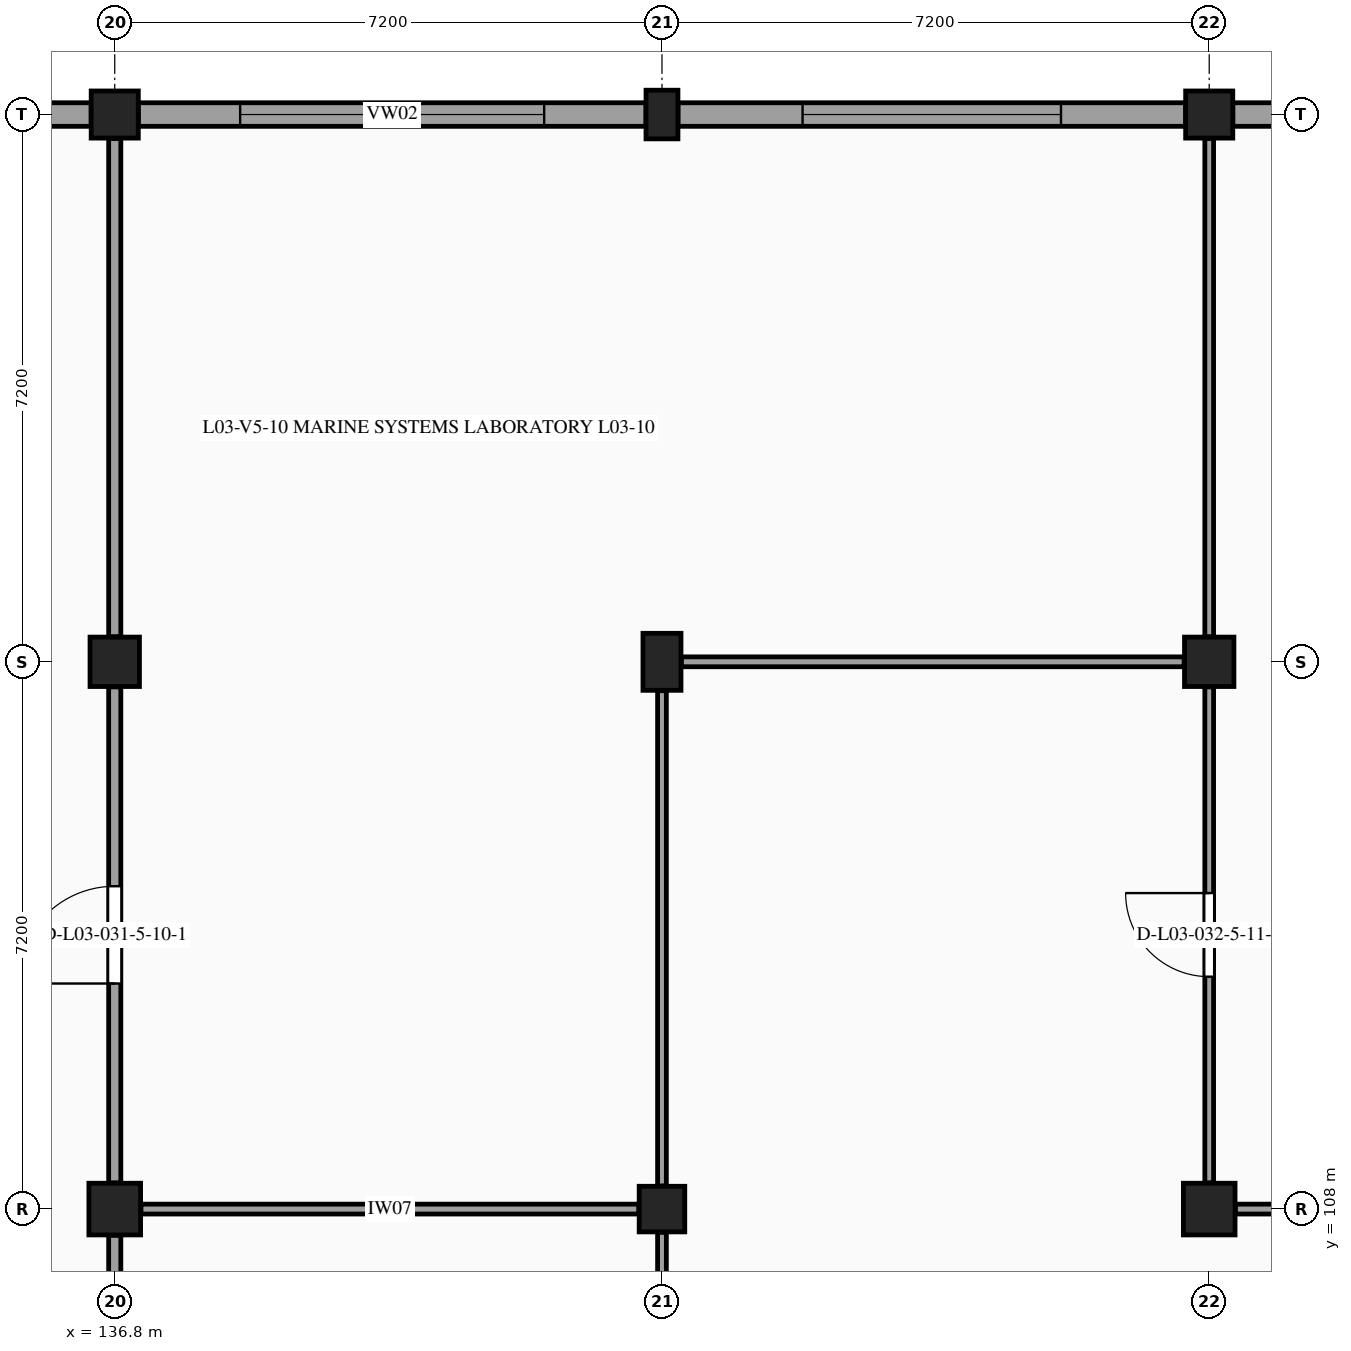
"""IFC4 building model, lengths in metres.
Left out: names, types, materials, properties, quantities, classifications, styles, units other than length and angle.
Written with IfcOpenShell. Run it as: python <this file> out.ifc"""

import sys

from ifc_helpers import new_model, si_unit, direction, frame, frame_2d, origin, origin_2d, place, context, subcontext, project, spatial, rectangle, extrude, element, fill, save


model = new_model("IFC4")
c1 = context("Model", 3, precision=1e-05, world=origin(), true_north=direction((0.0, 1.0)))
c2 = subcontext(c1, "Body", "Model", "MODEL_VIEW")
j1 = project(units=[si_unit("LENGTHUNIT", "METRE"), si_unit("PLANEANGLEUNIT", "RADIAN")], contexts=[c1])
p1 = place(None, origin())
s1 = spatial("IfcSite", under=j1, at=p1, CompositionType="ELEMENT")
p2 = place(p1, origin())
s2 = spatial("IfcBuilding", under=s1, at=p2, CompositionType="ELEMENT")
p3 = place(p2, frame((0.0, 0.0, 14.4)))
s3 = spatial("IfcBuildingStorey", under=s2, at=p3, CompositionType="ELEMENT", Elevation=14.4)
p4 = place(p3, frame((136.8, 108.0, 0.0), z_axis=(0.0, 0.0, 1.0), x_axis=(1.0, 0.0, 0.0)))
e1 = element("IfcColumn", 1, at=p4, inside=s3, PredefinedType="COLUMN", context=c2, shape_type="SweptSolid", body=[
    extrude(rectangle(XDim=0.68, YDim=0.68, at=origin_2d()), origin(), (0.0, 0.0, 1.0), 4.2),
])
p5 = place(p3, frame((136.8, 115.2, 0.0), z_axis=(0.0, 0.0, 1.0), x_axis=(1.0, 0.0, 0.0)))
e2 = element("IfcColumn", 2, at=p5, inside=s3, PredefinedType="COLUMN", context=c2, shape_type="SweptSolid", body=[
    extrude(rectangle(XDim=0.65, YDim=0.65, at=origin_2d()), origin(), (0.0, 0.0, 1.0), 4.2),
])
p6 = place(p3, frame((136.8, 122.4, 0.0), z_axis=(0.0, 0.0, 1.0), x_axis=(1.0, 0.0, 0.0)))
e3 = element("IfcColumn", 3, at=p6, inside=s3, PredefinedType="COLUMN", context=c2, shape_type="SweptSolid", body=[
    extrude(rectangle(XDim=0.62, YDim=0.62, at=origin_2d()), origin(), (0.0, 0.0, 1.0), 4.2),
])
p7 = place(p3, frame((144.0, 108.0, 0.0), z_axis=(0.0, 0.0, 1.0), x_axis=(1.0, 0.0, 0.0)))
e4 = element("IfcColumn", 4, at=p7, inside=s3, PredefinedType="COLUMN", context=c2, shape_type="SweptSolid", body=[
    extrude(rectangle(XDim=0.6, YDim=0.6, at=origin_2d()), origin(), (0.0, 0.0, 1.0), 4.2),
])
p8 = place(p3, frame((144.0, 115.2, 0.0), z_axis=(0.0, 0.0, 1.0), x_axis=(1.0, 0.0, 0.0)))
e5 = element("IfcColumn", 5, at=p8, inside=s3, PredefinedType="COLUMN", context=c2, shape_type="SweptSolid", body=[
    extrude(rectangle(XDim=0.5, YDim=0.75, at=origin_2d()), origin(), (0.0, 0.0, 1.0), 4.2),
])
p9 = place(p3, frame((144.0, 122.4, 0.0), z_axis=(0.0, 0.0, 1.0), x_axis=(1.0, 0.0, 0.0)))
e6 = element("IfcColumn", 6, at=p9, inside=s3, PredefinedType="PILASTER", context=c2, shape_type="SweptSolid", body=[
    extrude(rectangle(XDim=0.42, YDim=0.64, at=origin_2d()), origin(), (0.0, 0.0, 1.0), 4.2),
])
p10 = place(p3, frame((151.2, 108.0, 0.0), z_axis=(0.0, 0.0, 1.0), x_axis=(1.0, 0.0, 0.0)))
e7 = element("IfcColumn", 7, at=p10, inside=s3, PredefinedType="COLUMN", context=c2, shape_type="SweptSolid", body=[
    extrude(rectangle(XDim=0.68, YDim=0.68, at=origin_2d()), origin(), (0.0, 0.0, 1.0), 4.2),
])
p11 = place(p3, frame((151.2, 115.2, 0.0), z_axis=(0.0, 0.0, 1.0), x_axis=(1.0, 0.0, 0.0)))
e8 = element("IfcColumn", 8, at=p11, inside=s3, PredefinedType="COLUMN", context=c2, shape_type="SweptSolid", body=[
    extrude(rectangle(XDim=0.65, YDim=0.65, at=origin_2d()), origin(), (0.0, 0.0, 1.0), 4.2),
])
p12 = place(p3, frame((151.2, 122.4, 0.0), z_axis=(0.0, 0.0, 1.0), x_axis=(1.0, 0.0, 0.0)))
e9 = element("IfcColumn", 9, at=p12, inside=s3, PredefinedType="COLUMN", context=c2, shape_type="SweptSolid", body=[
    extrude(rectangle(XDim=0.62, YDim=0.62, at=origin_2d()), origin(), (0.0, 0.0, 1.0), 4.2),
])
p13 = place(p3, frame((129.81, 122.4, 0.0), z_axis=(0.0, 0.0, 1.0), x_axis=(1.0, 0.0, 0.0)))
e10 = element("IfcWall", 10, at=p13, inside=s3, PredefinedType="STANDARD", context=c2, shape_type="SweptSolid", body=[
    extrude(rectangle(XDim=6.68, YDim=0.31, at=frame_2d((3.34, 0.0))), origin(), (0.0, 0.0, 1.0), 3.16),
])
p14 = place(p13, frame((1.09, 0.0, 0.98)))
e11 = element("IfcOpeningElement", 11, at=p14, cuts=e10, PredefinedType="OPENING", context=c2, shape_type="SweptSolid", body=[
    extrude(rectangle(XDim=4.5, YDim=1.55, at=frame_2d((2.25, 0.775))), frame((0.0, 0.165, 0.0), z_axis=(0.0, -1.0, 0.0), x_axis=(1.0, 0.0, 0.0)), (0.0, 0.0, 1.0), 0.33),
])
p15 = place(p3, frame((137.11, 122.4, 0.0), z_axis=(0.0, 0.0, 1.0), x_axis=(1.0, 0.0, 0.0)))
e12 = element("IfcWall", 12, at=p15, inside=s3, PredefinedType="STANDARD", context=c2, shape_type="SweptSolid", body=[
    extrude(rectangle(XDim=6.68, YDim=0.31, at=frame_2d((3.34, 0.0))), origin(), (0.0, 0.0, 1.0), 3.185),
])
p16 = place(p15, frame((1.34, 0.0, 0.98)))
e13 = element("IfcOpeningElement", 13, at=p16, cuts=e12, PredefinedType="OPENING", context=c2, shape_type="SweptSolid", body=[
    extrude(rectangle(XDim=4.0, YDim=1.55, at=frame_2d((2.0, 0.775))), frame((0.0, 0.165, 0.0), z_axis=(0.0, -1.0, 0.0), x_axis=(1.0, 0.0, 0.0)), (0.0, 0.0, 1.0), 0.33),
])
p17 = place(p3, frame((144.21, 122.4, 0.0), z_axis=(0.0, 0.0, 1.0), x_axis=(1.0, 0.0, 0.0)))
e14 = element("IfcWall", 14, at=p17, inside=s3, PredefinedType="STANDARD", context=c2, shape_type="SweptSolid", body=[
    extrude(rectangle(XDim=6.68, YDim=0.31, at=frame_2d((3.34, 0.0))), origin(), (0.0, 0.0, 1.0), 3.185),
])
p18 = place(p17, frame((1.64, 0.0, 0.98)))
e15 = element("IfcOpeningElement", 15, at=p18, cuts=e14, PredefinedType="OPENING", context=c2, shape_type="SweptSolid", body=[
    extrude(rectangle(XDim=3.4, YDim=1.55, at=frame_2d((1.7, 0.775))), frame((0.0, 0.165, 0.0), z_axis=(0.0, -1.0, 0.0), x_axis=(1.0, 0.0, 0.0)), (0.0, 0.0, 1.0), 0.33),
])
p19 = place(p3, frame((151.51, 122.4, 0.0), z_axis=(0.0, 0.0, 1.0), x_axis=(1.0, 0.0, 0.0)))
e16 = element("IfcWall", 16, at=p19, inside=s3, PredefinedType="STANDARD", context=c2, shape_type="SweptSolid", body=[
    extrude(rectangle(XDim=6.68, YDim=0.31, at=frame_2d((3.34, 0.0))), origin(), (0.0, 0.0, 1.0), 3.185),
])
p20 = place(p19, frame((1.84, 0.0, 0.98)))
e17 = element("IfcOpeningElement", 17, at=p20, cuts=e16, PredefinedType="OPENING", context=c2, shape_type="SweptSolid", body=[
    extrude(rectangle(XDim=3.0, YDim=1.5, at=frame_2d((1.5, 0.75))), frame((0.0, 0.165, 0.0), z_axis=(0.0, -1.0, 0.0), x_axis=(1.0, 0.0, 0.0)), (0.0, 0.0, 1.0), 0.33),
])
p21 = place(p3, frame((136.8, 101.125, 0.0), z_axis=(0.0, 0.0, 1.0), x_axis=(0.0, 1.0, 0.0)))
e18 = element("IfcWall", 18, at=p21, inside=s3, PredefinedType="PARTITIONING", context=c2, shape_type="SweptSolid", body=[
    extrude(rectangle(XDim=6.53, YDim=0.16, at=frame_2d((3.265, 0.0))), origin(), (0.0, 0.0, 1.0), 3.225),
])
p22 = place(p3, frame((136.8, 108.345, 0.0), z_axis=(0.0, 0.0, 1.0), x_axis=(0.0, 1.0, 0.0)))
e19 = element("IfcWall", 19, at=p22, inside=s3, PredefinedType="PARTITIONING", context=c2, shape_type="SweptSolid", body=[
    extrude(rectangle(XDim=6.525, YDim=0.16, at=frame_2d((3.263, 0.0))), origin(), (0.0, 0.0, 1.0), 3.22),
])
p23 = place(p22, frame((2.623, 0.0, 0.0)))
e20 = element("IfcOpeningElement", 20, at=p23, cuts=e19, PredefinedType="OPENING", context=c2, shape_type="SweptSolid", body=[
    extrude(rectangle(XDim=1.28, YDim=2.24, at=frame_2d((0.64, 1.12))), frame((0.0, 0.09, 0.0), z_axis=(0.0, -1.0, 0.0), x_axis=(1.0, 0.0, 0.0)), (0.0, 0.0, 1.0), 0.18),
])
p24 = place(p3, frame((136.8, 115.53, 0.0), z_axis=(0.0, 0.0, 1.0), x_axis=(0.0, 1.0, 0.0)))
e21 = element("IfcWall", 21, at=p24, inside=s3, PredefinedType="PARTITIONING", context=c2, shape_type="SweptSolid", body=[
    extrude(rectangle(XDim=6.555, YDim=0.16, at=frame_2d((3.277, 0.0))), origin(), (0.0, 0.0, 1.0), 3.22),
])
p25 = place(p3, frame((144.0, 101.115, 0.0), z_axis=(0.0, 0.0, 1.0), x_axis=(0.0, 1.0, 0.0)))
e22 = element("IfcWall", 22, at=p25, inside=s3, PredefinedType="PARTITIONING", context=c2, shape_type="SweptSolid", body=[
    extrude(rectangle(XDim=6.58, YDim=0.115, at=frame_2d((3.29, 0.0))), origin(), (0.0, 0.0, 1.0), 3.25),
])
p26 = place(p25, frame((2.7, 0.0, 0.0)))
e23 = element("IfcOpeningElement", 23, at=p26, cuts=e22, PredefinedType="OPENING", context=c2, shape_type="SweptSolid", body=[
    extrude(rectangle(XDim=1.18, YDim=2.18, at=frame_2d((0.59, 1.09))), frame((0.0, 0.067, 0.0), z_axis=(0.0, -1.0, 0.0), x_axis=(1.0, 0.0, 0.0)), (0.0, 0.0, 1.0), 0.135),
])
p27 = place(p3, frame((137.145, 108.0, 0.0), z_axis=(0.0, 0.0, 1.0), x_axis=(1.0, 0.0, 0.0)))
e24 = element("IfcWall", 24, at=p27, inside=s3, PredefinedType="PARTITIONING", context=c2, shape_type="SweptSolid", body=[
    extrude(rectangle(XDim=6.55, YDim=0.13, at=frame_2d((3.275, 0.0))), origin(), (0.0, 0.0, 1.0), 3.2),
])
p28 = place(p3, frame((144.0, 108.305, 0.0), z_axis=(0.0, 0.0, 1.0), x_axis=(0.0, 1.0, 0.0)))
e25 = element("IfcWall", 25, at=p28, inside=s3, PredefinedType="PARTITIONING", context=c2, shape_type="SweptSolid", body=[
    extrude(rectangle(XDim=6.515, YDim=0.115, at=frame_2d((3.258, 0.0))), origin(), (0.0, 0.0, 1.0), 3.245),
])
p29 = place(p3, frame((151.2, 108.345, 0.0), z_axis=(0.0, 0.0, 1.0), x_axis=(0.0, 1.0, 0.0)))
e26 = element("IfcWall", 26, at=p29, inside=s3, PredefinedType="PARTITIONING", context=c2, shape_type="SweptSolid", body=[
    extrude(rectangle(XDim=6.525, YDim=0.115, at=frame_2d((3.263, 0.0))), origin(), (0.0, 0.0, 1.0), 3.245),
])
p30 = place(p29, frame((2.712, 0.0, 0.0)))
e27 = element("IfcOpeningElement", 27, at=p30, cuts=e26, PredefinedType="OPENING", context=c2, shape_type="SweptSolid", body=[
    extrude(rectangle(XDim=1.1, YDim=2.15, at=frame_2d((0.55, 1.075))), frame((0.0, 0.067, 0.0), z_axis=(0.0, -1.0, 0.0), x_axis=(1.0, 0.0, 0.0)), (0.0, 0.0, 1.0), 0.135),
])
p31 = place(p3, frame((144.255, 115.2, 0.0), z_axis=(0.0, 0.0, 1.0), x_axis=(1.0, 0.0, 0.0)))
e28 = element("IfcWall", 28, at=p31, inside=s3, PredefinedType="PARTITIONING", context=c2, shape_type="SweptSolid", body=[
    extrude(rectangle(XDim=6.615, YDim=0.13, at=frame_2d((3.308, 0.0))), origin(), (0.0, 0.0, 1.0), 3.215),
])
p32 = place(p3, frame((151.2, 115.53, 0.0), z_axis=(0.0, 0.0, 1.0), x_axis=(0.0, 1.0, 0.0)))
e29 = element("IfcWall", 29, at=p32, inside=s3, PredefinedType="PARTITIONING", context=c2, shape_type="SweptSolid", body=[
    extrude(rectangle(XDim=6.555, YDim=0.115, at=frame_2d((3.277, 0.0))), origin(), (0.0, 0.0, 1.0), 3.245),
])
p33 = place(p3, frame((151.545, 108.0, 0.0), z_axis=(0.0, 0.0, 1.0), x_axis=(1.0, 0.0, 0.0)))
e30 = element("IfcWall", 30, at=p33, inside=s3, PredefinedType="PARTITIONING", context=c2, shape_type="SweptSolid", body=[
    extrude(rectangle(XDim=6.55, YDim=0.13, at=frame_2d((3.275, 0.0))), origin(), (0.0, 0.0, 1.0), 3.22),
])
p34 = place(p16, origin())
e31 = element("IfcWindow", 31, at=p34, inside=s3, PartitioningType="SINGLE_PANEL", PredefinedType="WINDOW", context=c2, shape_type="SweptSolid", body=[
    extrude(rectangle(XDim=4.0, YDim=1.55, at=frame_2d((2.0, 0.775))), frame((0.0, -0.03, 0.0), z_axis=(0.0, -1.0, 0.0), x_axis=(1.0, 0.0, 0.0)), (0.0, 0.0, 1.0), 0.06),
])
fill(e13, e31)
p35 = place(p18, origin())
e32 = element("IfcWindow", 32, at=p35, inside=s3, PartitioningType="SINGLE_PANEL", PredefinedType="WINDOW", context=c2, shape_type="SweptSolid", body=[
    extrude(rectangle(XDim=3.4, YDim=1.55, at=frame_2d((1.7, 0.775))), frame((0.0, -0.03, 0.0), z_axis=(0.0, -1.0, 0.0), x_axis=(1.0, 0.0, 0.0)), (0.0, 0.0, 1.0), 0.06),
])
fill(e15, e32)
p36 = place(p23, origin())
e33 = element("IfcDoor", 33, at=p36, inside=s3, OperationType="SINGLE_SWING_LEFT", PredefinedType="DOOR", context=c2, shape_type="SweptSolid", body=[
    extrude(rectangle(XDim=1.28, YDim=2.24, at=frame_2d((0.64, 1.12))), frame((0.0, 0.025, 0.0), z_axis=(0.0, -1.0, 0.0), x_axis=(1.0, 0.0, 0.0)), (0.0, 0.0, 1.0), 0.05),
])
fill(e20, e33)
p37 = place(p30, origin())
e34 = element("IfcDoor", 34, at=p37, inside=s3, OperationType="SINGLE_SWING_RIGHT", PredefinedType="DOOR", context=c2, shape_type="SweptSolid", body=[
    extrude(rectangle(XDim=1.1, YDim=2.15, at=frame_2d((0.55, 1.075))), frame((0.0, 0.025, 0.0), z_axis=(0.0, -1.0, 0.0), x_axis=(1.0, 0.0, 0.0)), (0.0, 0.0, 1.0), 0.05),
])
fill(e27, e34)
save(model, sys.argv[1])
